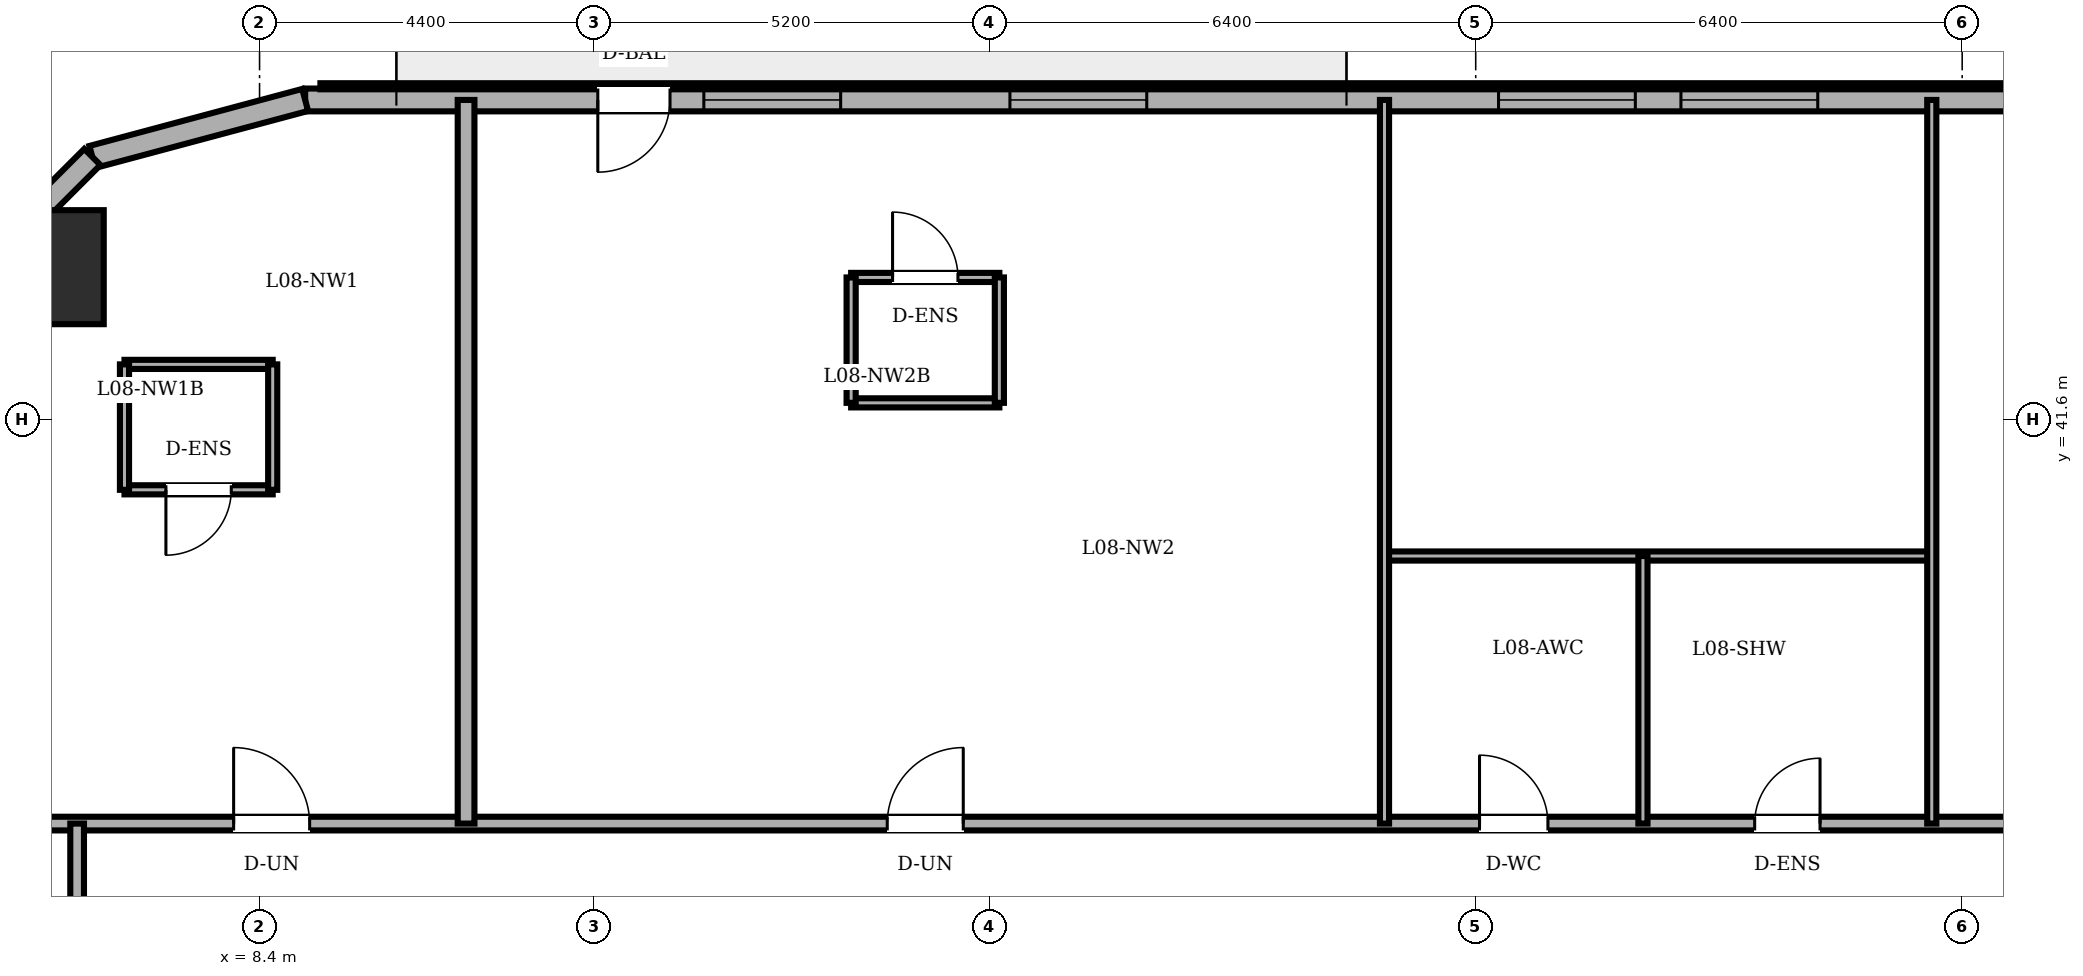
"""IFC4 building model, lengths in metres.
Left out: names, types, materials, properties, quantities, classifications, styles, units other than length and angle.
Written with IfcOpenShell. Run it as: python <this file> out.ifc"""

import sys

from ifc_helpers import new_model, si_unit, direction, frame, frame_2d, origin, origin_2d, place, context, subcontext, project, spatial, rectangle, circle, extrude, element, fill, save


model = new_model("IFC4")
c1 = context("Model", 3, precision=1e-05, world=origin(), true_north=direction((0.0, 1.0)))
c2 = subcontext(c1, "Body", "Model", "MODEL_VIEW")
j1 = project(units=[si_unit("LENGTHUNIT", "METRE"), si_unit("PLANEANGLEUNIT", "RADIAN")], contexts=[c1])
p1 = place(None, origin())
s1 = spatial("IfcSite", under=j1, at=p1, CompositionType="ELEMENT")
p2 = place(p1, origin())
s2 = spatial("IfcBuilding", under=s1, at=p2, CompositionType="ELEMENT")
p3 = place(p2, frame((0.0, 0.0, 32.4)))
s3 = spatial("IfcBuildingStorey", under=s2, at=p3, CompositionType="ELEMENT", Elevation=32.4)
p4 = place(p3, frame((5.6, 43.6, 0.0), z_axis=(0.0, 0.0, 1.0), x_axis=(1.0, 0.0, 0.0)))
e1 = element("IfcColumn", 1, at=p4, inside=s3, PredefinedType="COLUMN", context=c2, shape_type="SweptSolid", body=[
    extrude(circle(Radius=0.75, at=origin_2d()), origin(), (0.0, 0.0, 1.0), 3.6),
])
p5 = place(p3, frame((39.079, 45.8, 0.0), z_axis=(0.0, 0.0, 1.0), x_axis=(-1.0, 0.0, 0.0)))
e2 = element("IfcWall", 2, at=p5, inside=s3, PredefinedType="SOLIDWALL", context=c2, shape_type="SweptSolid", body=[
    extrude(rectangle(XDim=30.079, YDim=0.3, at=frame_2d((15.04, 0.0))), origin(), (0.0, 0.0, 1.0), 3.4),
])
p6 = place(p5, frame((25.279, 0.0, 0.0)))
e3 = element("IfcOpeningElement", 3, at=p6, cuts=e2, PredefinedType="OPENING", context=c2, shape_type="SweptSolid", body=[
    extrude(rectangle(XDim=0.95, YDim=2.2, at=frame_2d((0.475, 1.1))), frame((0.0, 0.16, 0.0), z_axis=(0.0, -1.0, 0.0), x_axis=(1.0, 0.0, 0.0)), (0.0, 0.0, 1.0), 0.32),
])
p7 = place(p5, frame((2.226, 0.0, 0.85)))
e4 = element("IfcOpeningElement", 4, at=p7, cuts=e2, PredefinedType="OPENING", context=c2, shape_type="SweptSolid", body=[
    extrude(rectangle(XDim=1.8, YDim=1.55, at=frame_2d((0.9, 0.775))), frame((0.0, 0.16, 0.0), z_axis=(0.0, -1.0, 0.0), x_axis=(1.0, 0.0, 0.0)), (0.0, 0.0, 1.0), 0.32),
])
p8 = place(p5, frame((5.003, 0.0, 0.85)))
e5 = element("IfcOpeningElement", 5, at=p8, cuts=e2, PredefinedType="OPENING", context=c2, shape_type="SweptSolid", body=[
    extrude(rectangle(XDim=1.8, YDim=1.55, at=frame_2d((0.9, 0.775))), frame((0.0, 0.16, 0.0), z_axis=(0.0, -1.0, 0.0), x_axis=(1.0, 0.0, 0.0)), (0.0, 0.0, 1.0), 0.32),
])
p9 = place(p5, frame((10.179, 0.0, 0.85)))
e6 = element("IfcOpeningElement", 6, at=p9, cuts=e2, PredefinedType="OPENING", context=c2, shape_type="SweptSolid", body=[
    extrude(rectangle(XDim=1.8, YDim=1.55, at=frame_2d((0.9, 0.775))), frame((0.0, 0.16, 0.0), z_axis=(0.0, -1.0, 0.0), x_axis=(1.0, 0.0, 0.0)), (0.0, 0.0, 1.0), 0.32),
])
p10 = place(p5, frame((12.579, 0.0, 0.85)))
e7 = element("IfcOpeningElement", 7, at=p10, cuts=e2, PredefinedType="OPENING", context=c2, shape_type="SweptSolid", body=[
    extrude(rectangle(XDim=1.8, YDim=1.55, at=frame_2d((0.9, 0.775))), frame((0.0, 0.16, 0.0), z_axis=(0.0, -1.0, 0.0), x_axis=(1.0, 0.0, 0.0)), (0.0, 0.0, 1.0), 0.32),
])
p11 = place(p5, frame((19.007, 0.0, 0.85)))
e8 = element("IfcOpeningElement", 8, at=p11, cuts=e2, PredefinedType="OPENING", context=c2, shape_type="SweptSolid", body=[
    extrude(rectangle(XDim=1.8, YDim=1.55, at=frame_2d((0.9, 0.775))), frame((0.0, 0.16, 0.0), z_axis=(0.0, -1.0, 0.0), x_axis=(1.0, 0.0, 0.0)), (0.0, 0.0, 1.0), 0.32),
])
p12 = place(p5, frame((23.034, 0.0, 0.85)))
e9 = element("IfcOpeningElement", 9, at=p12, cuts=e2, PredefinedType="OPENING", context=c2, shape_type="SweptSolid", body=[
    extrude(rectangle(XDim=1.8, YDim=1.55, at=frame_2d((0.9, 0.775))), frame((0.0, 0.16, 0.0), z_axis=(0.0, -1.0, 0.0), x_axis=(1.0, 0.0, 0.0)), (0.0, 0.0, 1.0), 0.32),
])
p13 = place(p3, frame((9.0, 45.8, 0.0), z_axis=(0.0, 0.0, 1.0), x_axis=(-0.96594917914, -0.258731875344, 0.0)))
e10 = element("IfcWall", 10, at=p13, inside=s3, PredefinedType="SOLIDWALL", context=c2, shape_type="SweptSolid", body=[
    extrude(rectangle(XDim=2.899, YDim=0.3, at=frame_2d((1.449, 0.0))), origin(), (0.0, 0.0, 1.0), 3.4),
])
p14 = place(p3, frame((6.2, 45.05, 0.0), z_axis=(0.0, 0.0, 1.0), x_axis=(-0.707106781187, -0.707106781187, 0.0)))
e11 = element("IfcWall", 11, at=p14, inside=s3, PredefinedType="SOLIDWALL", context=c2, shape_type="SweptSolid", body=[
    extrude(rectangle(XDim=2.899, YDim=0.3, at=frame_2d((1.45, 0.0))), origin(), (0.0, 0.0, 1.0), 3.4),
])
p15 = place(p3, frame((6.623, 42.321, 0.0), z_axis=(0.0, 0.0, 1.0), x_axis=(1.0, 0.0, 0.0)))
e12 = element("IfcWall", 12, at=p15, inside=s3, PredefinedType="PARTITIONING", context=c2, shape_type="SweptSolid", body=[
    extrude(rectangle(XDim=1.95, YDim=0.12, at=frame_2d((0.975, 0.0))), origin(), (0.0, 0.0, 1.0), 3.4),
])
p16 = place(p3, frame((8.573, 40.671, 0.0), z_axis=(0.0, 0.0, 1.0), x_axis=(-1.0, 0.0, 0.0)))
e13 = element("IfcWall", 13, at=p16, inside=s3, PredefinedType="PARTITIONING", context=c2, shape_type="SweptSolid", body=[
    extrude(rectangle(XDim=1.95, YDim=0.12, at=frame_2d((0.975, 0.0))), origin(), (0.0, 0.0, 1.0), 3.4),
])
p17 = place(p16, frame((0.545, 0.0, 0.0)))
e14 = element("IfcOpeningElement", 14, at=p17, cuts=e13, PredefinedType="OPENING", context=c2, shape_type="SweptSolid", body=[
    extrude(rectangle(XDim=0.86, YDim=2.1, at=frame_2d((0.43, 1.05))), frame((0.0, 0.07, 0.0), z_axis=(0.0, -1.0, 0.0), x_axis=(1.0, 0.0, 0.0)), (0.0, 0.0, 1.0), 0.14),
])
for number, where, z_axis, x_axis in (
    (15, (6.623, 42.321, 0.0), (0.0, 0.0, 1.0), (0.0, -1.0, 0.0)),
    (16, (8.573, 40.671, 0.0), (0.0, 0.0, 1.0), (0.0, 1.0, 0.0)),
):
    element("IfcWall", number, at=place(p3, frame(where, z_axis=z_axis, x_axis=x_axis)), inside=s3, PredefinedType="PARTITIONING", context=c2, shape_type="SweptSolid", body=[
        extrude(rectangle(XDim=1.65, YDim=0.12, at=frame_2d((0.825, 0.0))), origin(), (0.0, 0.0, 1.0), 3.4),
    ])
p18 = place(p3, frame((16.183, 43.465, 0.0), z_axis=(0.0, 0.0, 1.0), x_axis=(1.0, 0.0, 0.0)))
e17 = element("IfcWall", 17, at=p18, inside=s3, PredefinedType="PARTITIONING", context=c2, shape_type="SweptSolid", body=[
    extrude(rectangle(XDim=1.95, YDim=0.12, at=frame_2d((0.975, 0.0))), origin(), (0.0, 0.0, 1.0), 2.882),
])
p19 = place(p18, frame((0.545, 0.0, 0.0)))
e18 = element("IfcOpeningElement", 18, at=p19, cuts=e17, PredefinedType="OPENING", context=c2, shape_type="SweptSolid", body=[
    extrude(rectangle(XDim=0.86, YDim=2.1, at=frame_2d((0.43, 1.05))), frame((0.0, 0.07, 0.0), z_axis=(0.0, -1.0, 0.0), x_axis=(1.0, 0.0, 0.0)), (0.0, 0.0, 1.0), 0.14),
])
p20 = place(p3, frame((18.133, 41.815, 0.0), z_axis=(0.0, 0.0, 1.0), x_axis=(-1.0, 0.0, 0.0)))
e19 = element("IfcWall", 19, at=p20, inside=s3, PredefinedType="PARTITIONING", context=c2, shape_type="SweptSolid", body=[
    extrude(rectangle(XDim=1.95, YDim=0.12, at=frame_2d((0.975, 0.0))), origin(), (0.0, 0.0, 1.0), 3.4),
])
for number, where, z_axis, x_axis in (
    (20, (16.183, 43.465, 0.0), (0.0, 0.0, 1.0), (0.0, -1.0, 0.0)),
    (21, (18.133, 41.815, 0.0), (0.0, 0.0, 1.0), (0.0, 1.0, 0.0)),
):
    element("IfcWall", number, at=place(p3, frame(where, z_axis=z_axis, x_axis=x_axis)), inside=s3, PredefinedType="PARTITIONING", context=c2, shape_type="SweptSolid", body=[
        extrude(rectangle(XDim=1.65, YDim=0.12, at=frame_2d((0.825, 0.0))), origin(), (0.0, 0.0, 1.0), 3.4),
    ])
p21 = place(p3, frame((3.4, 36.28, 0.0), z_axis=(0.0, 0.0, 1.0), x_axis=(1.0, 0.0, 0.0)))
e22 = element("IfcWall", 22, at=p21, inside=s3, PredefinedType="PARTITIONING", context=c2, shape_type="SweptSolid", body=[
    extrude(rectangle(XDim=36.45, YDim=0.18, at=frame_2d((18.225, 0.0))), origin(), (0.0, 0.0, 1.0), 3.4),
])
p22 = place(p21, frame((21.05, 0.0, 0.0)))
e23 = element("IfcOpeningElement", 23, at=p22, cuts=e22, PredefinedType="OPENING", context=c2, shape_type="SweptSolid", body=[
    extrude(rectangle(XDim=0.9, YDim=2.1, at=frame_2d((0.45, 1.05))), frame((0.0, 0.1, 0.0), z_axis=(0.0, -1.0, 0.0), x_axis=(1.0, 0.0, 0.0)), (0.0, 0.0, 1.0), 0.2),
])
p23 = place(p21, frame((24.67, 0.0, 0.0)))
e24 = element("IfcOpeningElement", 24, at=p23, cuts=e22, PredefinedType="OPENING", context=c2, shape_type="SweptSolid", body=[
    extrude(rectangle(XDim=0.86, YDim=2.1, at=frame_2d((0.43, 1.05))), frame((0.0, 0.1, 0.0), z_axis=(0.0, -1.0, 0.0), x_axis=(1.0, 0.0, 0.0)), (0.0, 0.0, 1.0), 0.2),
])
p24 = place(p21, frame((4.659, 0.0, 0.0)))
e25 = element("IfcOpeningElement", 25, at=p24, cuts=e22, PredefinedType="OPENING", context=c2, shape_type="SweptSolid", body=[
    extrude(rectangle(XDim=1.0, YDim=2.15, at=frame_2d((0.5, 1.075))), frame((0.0, 0.1, 0.0), z_axis=(0.0, -1.0, 0.0), x_axis=(1.0, 0.0, 0.0)), (0.0, 0.0, 1.0), 0.2),
])
p25 = place(p21, frame((13.258, 0.0, 0.0)))
e26 = element("IfcOpeningElement", 26, at=p25, cuts=e22, PredefinedType="OPENING", context=c2, shape_type="SweptSolid", body=[
    extrude(rectangle(XDim=1.0, YDim=2.15, at=frame_2d((0.5, 1.075))), frame((0.0, 0.1, 0.0), z_axis=(0.0, -1.0, 0.0), x_axis=(1.0, 0.0, 0.0)), (0.0, 0.0, 1.0), 0.2),
])
p26 = place(p21, frame((30.965, 0.0, 0.0)))
e27 = element("IfcOpeningElement", 27, at=p26, cuts=e22, PredefinedType="OPENING", context=c2, shape_type="SweptSolid", body=[
    extrude(rectangle(XDim=1.0, YDim=2.15, at=frame_2d((0.5, 1.075))), frame((0.0, 0.1, 0.0), z_axis=(0.0, -1.0, 0.0), x_axis=(1.0, 0.0, 0.0)), (0.0, 0.0, 1.0), 0.2),
])
p27 = place(p3, frame((23.2, 39.8, 0.0), z_axis=(0.0, 0.0, 1.0), x_axis=(1.0, 0.0, 0.0)))
e28 = element("IfcWall", 28, at=p27, inside=s3, PredefinedType="PARTITIONING", context=c2, shape_type="SweptSolid", body=[
    extrude(rectangle(XDim=7.2, YDim=0.12, at=frame_2d((3.6, 0.0))), origin(), (0.0, 0.0, 1.0), 3.4),
])
p28 = place(p3, frame((6.0, 33.82, 0.0), z_axis=(0.0, 0.0, 1.0), x_axis=(0.0, 1.0, 0.0)))
e29 = element("IfcWall", 29, at=p28, inside=s3, PredefinedType="PARTITIONING", context=c2, shape_type="SweptSolid", body=[
    extrude(rectangle(XDim=2.46, YDim=0.18, at=frame_2d((1.23, 0.0))), origin(), (0.0, 0.0, 1.0), 3.4),
])
p29 = place(p3, frame((11.117, 36.28, 0.0), z_axis=(0.0, 0.0, 1.0), x_axis=(0.0, 1.0, 0.0)))
e30 = element("IfcWall", 30, at=p29, inside=s3, PredefinedType="PARTITIONING", context=c2, shape_type="SweptSolid", body=[
    extrude(rectangle(XDim=9.52, YDim=0.22, at=frame_2d((4.76, 0.0))), origin(), (0.0, 0.0, 1.0), 3.4),
])
p30 = place(p3, frame((23.2, 36.28, 0.0), z_axis=(0.0, 0.0, 1.0), x_axis=(0.0, 1.0, 0.0)))
e31 = element("IfcWall", 31, at=p30, inside=s3, PredefinedType="PARTITIONING", context=c2, shape_type="SweptSolid", body=[
    extrude(rectangle(XDim=9.52, YDim=0.12, at=frame_2d((4.76, 0.0))), origin(), (0.0, 0.0, 1.0), 3.4),
])
p31 = place(p3, frame((26.6, 36.28, 0.0), z_axis=(0.0, 0.0, 1.0), x_axis=(0.0, 1.0, 0.0)))
e32 = element("IfcWall", 32, at=p31, inside=s3, PredefinedType="PARTITIONING", context=c2, shape_type="SweptSolid", body=[
    extrude(rectangle(XDim=3.52, YDim=0.12, at=frame_2d((1.76, 0.0))), origin(), (0.0, 0.0, 1.0), 3.4),
])
p32 = place(p3, frame((30.4, 36.28, 0.0), z_axis=(0.0, 0.0, 1.0), x_axis=(0.0, 1.0, 0.0)))
e33 = element("IfcWall", 33, at=p32, inside=s3, PredefinedType="PARTITIONING", context=c2, shape_type="SweptSolid", body=[
    extrude(rectangle(XDim=9.52, YDim=0.12, at=frame_2d((4.76, 0.0))), origin(), (0.0, 0.0, 1.0), 3.4),
])
p33 = place(p6, origin())
e34 = element("IfcDoor", 34, at=p33, inside=s3, OperationType="SINGLE_SWING_RIGHT", PredefinedType="DOOR", context=c2, shape_type="SweptSolid", body=[
    extrude(rectangle(XDim=0.95, YDim=2.2, at=frame_2d((0.475, 1.1))), frame((0.0, 0.025, 0.0), z_axis=(0.0, -1.0, 0.0), x_axis=(1.0, 0.0, 0.0)), (0.0, 0.0, 1.0), 0.05),
])
fill(e3, e34)
p34 = place(p9, origin())
e35 = element("IfcWindow", 35, at=p34, inside=s3, PartitioningType="DOUBLE_PANEL_VERTICAL", PredefinedType="WINDOW", context=c2, shape_type="SweptSolid", body=[
    extrude(rectangle(XDim=1.8, YDim=1.55, at=frame_2d((0.9, 0.775))), frame((0.0, 0.03, 0.0), z_axis=(0.0, -1.0, 0.0), x_axis=(1.0, 0.0, 0.0)), (0.0, 0.0, 1.0), 0.06),
])
fill(e6, e35)
p35 = place(p10, origin())
e36 = element("IfcWindow", 36, at=p35, inside=s3, PartitioningType="DOUBLE_PANEL_VERTICAL", PredefinedType="WINDOW", context=c2, shape_type="SweptSolid", body=[
    extrude(rectangle(XDim=1.8, YDim=1.55, at=frame_2d((0.9, 0.775))), frame((0.0, 0.03, 0.0), z_axis=(0.0, -1.0, 0.0), x_axis=(1.0, 0.0, 0.0)), (0.0, 0.0, 1.0), 0.06),
])
fill(e7, e36)
p36 = place(p11, origin())
e37 = element("IfcWindow", 37, at=p36, inside=s3, PartitioningType="DOUBLE_PANEL_VERTICAL", PredefinedType="WINDOW", context=c2, shape_type="SweptSolid", body=[
    extrude(rectangle(XDim=1.8, YDim=1.55, at=frame_2d((0.9, 0.775))), frame((0.0, 0.03, 0.0), z_axis=(0.0, -1.0, 0.0), x_axis=(1.0, 0.0, 0.0)), (0.0, 0.0, 1.0), 0.06),
])
fill(e8, e37)
p37 = place(p12, origin())
e38 = element("IfcWindow", 38, at=p37, inside=s3, PartitioningType="DOUBLE_PANEL_VERTICAL", PredefinedType="WINDOW", context=c2, shape_type="SweptSolid", body=[
    extrude(rectangle(XDim=1.8, YDim=1.55, at=frame_2d((0.9, 0.775))), frame((0.0, 0.03, 0.0), z_axis=(0.0, -1.0, 0.0), x_axis=(1.0, 0.0, 0.0)), (0.0, 0.0, 1.0), 0.06),
])
fill(e9, e38)
p38 = place(p17, origin())
e39 = element("IfcDoor", 39, at=p38, inside=s3, OperationType="SINGLE_SWING_RIGHT", PredefinedType="DOOR", context=c2, shape_type="SweptSolid", body=[
    extrude(rectangle(XDim=0.86, YDim=2.1, at=frame_2d((0.43, 1.05))), frame((0.0, 0.025, 0.0), z_axis=(0.0, -1.0, 0.0), x_axis=(1.0, 0.0, 0.0)), (0.0, 0.0, 1.0), 0.05),
])
fill(e14, e39)
p39 = place(p19, origin())
e40 = element("IfcDoor", 40, at=p39, inside=s3, OperationType="SINGLE_SWING_LEFT", PredefinedType="DOOR", context=c2, shape_type="SweptSolid", body=[
    extrude(rectangle(XDim=0.86, YDim=2.1, at=frame_2d((0.43, 1.05))), frame((0.0, 0.025, 0.0), z_axis=(0.0, -1.0, 0.0), x_axis=(1.0, 0.0, 0.0)), (0.0, 0.0, 1.0), 0.05),
])
fill(e18, e40)
p40 = place(p22, origin())
e41 = element("IfcDoor", 41, at=p40, inside=s3, OperationType="SINGLE_SWING_LEFT", PredefinedType="DOOR", context=c2, shape_type="SweptSolid", body=[
    extrude(rectangle(XDim=0.9, YDim=2.1, at=frame_2d((0.45, 1.05))), frame((0.0, 0.025, 0.0), z_axis=(0.0, -1.0, 0.0), x_axis=(1.0, 0.0, 0.0)), (0.0, 0.0, 1.0), 0.05),
])
fill(e23, e41)
p41 = place(p23, origin())
e42 = element("IfcDoor", 42, at=p41, inside=s3, OperationType="SINGLE_SWING_RIGHT", PredefinedType="DOOR", context=c2, shape_type="SweptSolid", body=[
    extrude(rectangle(XDim=0.86, YDim=2.1, at=frame_2d((0.43, 1.05))), frame((0.0, 0.025, 0.0), z_axis=(0.0, -1.0, 0.0), x_axis=(1.0, 0.0, 0.0)), (0.0, 0.0, 1.0), 0.05),
])
fill(e24, e42)
p42 = place(p24, origin())
e43 = element("IfcDoor", 43, at=p42, inside=s3, OperationType="SINGLE_SWING_LEFT", PredefinedType="DOOR", context=c2, shape_type="SweptSolid", body=[
    extrude(rectangle(XDim=1.0, YDim=2.15, at=frame_2d((0.5, 1.075))), frame((0.0, 0.025, 0.0), z_axis=(0.0, -1.0, 0.0), x_axis=(1.0, 0.0, 0.0)), (0.0, 0.0, 1.0), 0.05),
])
fill(e25, e43)
p43 = place(p25, origin())
e44 = element("IfcDoor", 44, at=p43, inside=s3, OperationType="SINGLE_SWING_RIGHT", PredefinedType="DOOR", context=c2, shape_type="SweptSolid", body=[
    extrude(rectangle(XDim=1.0, YDim=2.15, at=frame_2d((0.5, 1.075))), frame((0.0, 0.025, 0.0), z_axis=(0.0, -1.0, 0.0), x_axis=(1.0, 0.0, 0.0)), (0.0, 0.0, 1.0), 0.05),
])
fill(e26, e44)
save(model, sys.argv[1])
